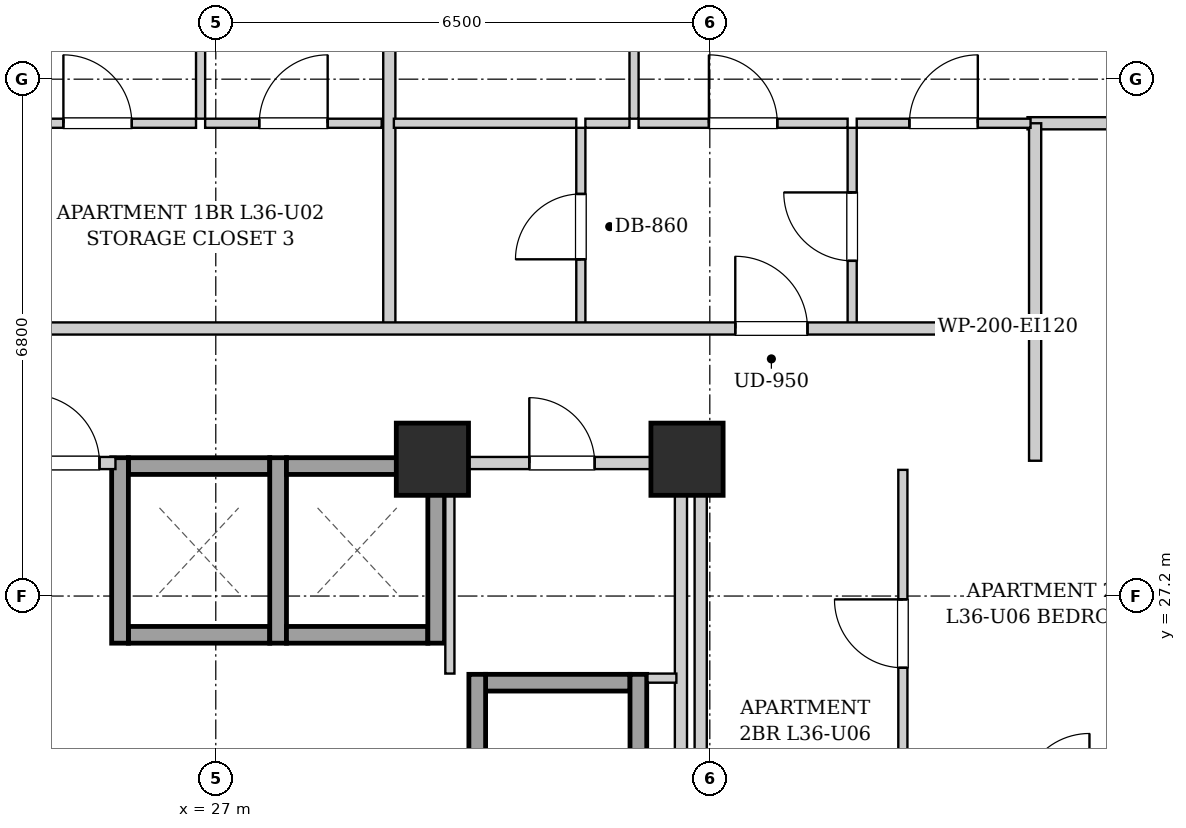
"""IFC4 building model, lengths in metres.
Left out: names, types, materials, properties, quantities, classifications, styles, units other than length and angle.
Written with IfcOpenShell. Run it as: python <this file> out.ifc"""

import sys

from ifc_helpers import new_model, si_unit, direction, frame, frame_2d, origin, origin_2d, place, context, subcontext, project, spatial, rectangle, extrude, element, fill, save


model = new_model("IFC4")
c1 = context("Model", 3, precision=1e-05, world=origin(), true_north=direction((0.0, 1.0)))
c2 = subcontext(c1, "Body", "Model", "MODEL_VIEW")
j1 = project(units=[si_unit("LENGTHUNIT", "METRE"), si_unit("PLANEANGLEUNIT", "RADIAN")], contexts=[c1])
p1 = place(None, origin())
s1 = spatial("IfcSite", under=j1, at=p1, CompositionType="ELEMENT")
p2 = place(p1, origin())
s2 = spatial("IfcBuilding", under=s1, at=p2, CompositionType="ELEMENT")
p3 = place(p2, frame((0.0, 0.0, 127.65)))
s3 = spatial("IfcBuildingStorey", under=s2, at=p3, CompositionType="ELEMENT", Elevation=127.65)
for number, where, z_axis, x_axis in (
    (1, (29.85, 29.0, 0.0), (0.0, 0.0, 1.0), (1.0, 0.0, 0.0)),
    (2, (33.2, 29.0, 0.0), (0.0, 0.0, 1.0), (1.0, 0.0, 0.0)),
):
    element("IfcColumn", number, at=place(p3, frame(where, z_axis=z_axis, x_axis=x_axis)), inside=s3, PredefinedType="COLUMN", context=c2, shape_type="SweptSolid", body=[
        extrude(rectangle(XDim=0.95, YDim=0.95, at=origin_2d()), origin(), (0.0, 0.0, 1.0), 3.25),
    ])
for number, where, z_axis, x_axis in (
    (3, (25.85, 26.69, 0.0), (0.0, 0.0, 1.0), (1.0, 0.0, 0.0)),
    (4, (25.85, 28.91, 0.0), (0.0, 0.0, 1.0), (1.0, 0.0, 0.0)),
):
    element("IfcWall", number, at=place(p3, frame(where, z_axis=z_axis, x_axis=x_axis)), inside=s3, PredefinedType="SHEAR", context=c2, shape_type="SweptSolid", body=[
        extrude(rectangle(XDim=1.86, YDim=0.22, at=frame_2d((0.93, 0.0))), origin(), (0.0, 0.0, 1.0), 2.99),
    ])
for number, where, z_axis, x_axis in (
    (5, (25.74, 26.58, 0.0), (0.0, 0.0, 1.0), (0.0, 1.0, 0.0)),
    (6, (27.82, 26.58, 0.0), (0.0, 0.0, 1.0), (0.0, 1.0, 0.0)),
):
    element("IfcWall", number, at=place(p3, frame(where, z_axis=z_axis, x_axis=x_axis)), inside=s3, PredefinedType="SHEAR", context=c2, shape_type="SweptSolid", body=[
        extrude(rectangle(XDim=2.44, YDim=0.22, at=frame_2d((1.22, 0.0))), origin(), (0.0, 0.0, 1.0), 2.99),
    ])
for number, where, z_axis, x_axis in (
    (7, (27.93, 26.69, 0.0), (0.0, 0.0, 1.0), (1.0, 0.0, 0.0)),
    (8, (27.93, 28.91, 0.0), (0.0, 0.0, 1.0), (1.0, 0.0, 0.0)),
):
    element("IfcWall", number, at=place(p3, frame(where, z_axis=z_axis, x_axis=x_axis)), inside=s3, PredefinedType="SHEAR", context=c2, shape_type="SweptSolid", body=[
        extrude(rectangle(XDim=1.86, YDim=0.22, at=frame_2d((0.93, 0.0))), origin(), (0.0, 0.0, 1.0), 2.99),
    ])
p4 = place(p3, frame((29.9, 26.58, 0.0), z_axis=(0.0, 0.0, 1.0), x_axis=(0.0, 1.0, 0.0)))
e9 = element("IfcWall", 9, at=p4, inside=s3, PredefinedType="SHEAR", context=c2, shape_type="SweptSolid", body=[
    extrude(rectangle(XDim=2.44, YDim=0.22, at=frame_2d((1.22, 0.0))), origin(), (0.0, 0.0, 1.0), 2.99),
])
p5 = place(p3, frame((30.55, 26.06, 0.0), z_axis=(0.0, 0.0, 1.0), x_axis=(1.0, 0.0, 0.0)))
e10 = element("IfcWall", 10, at=p5, inside=s3, PredefinedType="SHEAR", context=c2, shape_type="SweptSolid", body=[
    extrude(rectangle(XDim=1.9, YDim=0.22, at=frame_2d((0.95, 0.0))), origin(), (0.0, 0.0, 1.0), 2.99),
])
for number, where, z_axis, x_axis in (
    (11, (30.44, 24.1, 0.0), (0.0, 0.0, 1.0), (0.0, 1.0, 0.0)),
    (12, (32.56, 24.1, 0.0), (0.0, 0.0, 1.0), (0.0, 1.0, 0.0)),
):
    element("IfcWall", number, at=place(p3, frame(where, z_axis=z_axis, x_axis=x_axis)), inside=s3, PredefinedType="SHEAR", context=c2, shape_type="SweptSolid", body=[
        extrude(rectangle(XDim=2.07, YDim=0.22, at=frame_2d((1.035, 0.0))), origin(), (0.0, 0.0, 1.0), 2.99),
    ])
p6 = place(p3, frame((33.12, 24.12, 0.0), z_axis=(0.0, 0.0, 1.0), x_axis=(0.0, 1.0, 0.0)))
e13 = element("IfcWall", 13, at=p6, inside=s3, PredefinedType="PARTITIONING", context=c2, shape_type="SweptSolid", body=[
    extrude(rectangle(XDim=4.76, YDim=0.16, at=frame_2d((2.38, 0.0))), origin(), (0.0, 0.0, 1.0), 2.325),
])
p7 = place(p3, frame((24.36, 28.95, 0.0), z_axis=(0.0, 0.0, 1.0), x_axis=(1.0, 0.0, 0.0)))
e14 = element("IfcWall", 14, at=p7, inside=s3, PredefinedType="PARTITIONING", context=c2, shape_type="SweptSolid", body=[
    extrude(rectangle(XDim=1.32, YDim=0.16, at=frame_2d((0.66, 0.0))), origin(), (0.0, 0.0, 1.0), 2.426),
])
p8 = place(p7, frame((0.21, 0.0, 0.0)))
e15 = element("IfcOpeningElement", 15, at=p8, cuts=e14, PredefinedType="OPENING", context=c2, shape_type="SweptSolid", body=[
    extrude(rectangle(XDim=0.9, YDim=2.05, at=frame_2d((0.45, 1.025))), frame((0.0, 0.09, 0.0), z_axis=(0.0, -1.0, 0.0), x_axis=(1.0, 0.0, 0.0)), (0.0, 0.0, 1.0), 0.18),
])
p9 = place(p3, frame((30.08, 26.18, 0.0), z_axis=(0.0, 0.0, 1.0), x_axis=(0.0, 1.0, 0.0)))
e16 = element("IfcWall", 16, at=p9, inside=s3, PredefinedType="PARTITIONING", context=c2, shape_type="SweptSolid", body=[
    extrude(rectangle(XDim=2.68, YDim=0.12, at=frame_2d((1.34, 0.0))), origin(), (0.0, 0.0, 1.0), 2.99),
])
p10 = place(p3, frame((32.68, 26.12, 0.0), z_axis=(0.0, 0.0, 1.0), x_axis=(1.0, 0.0, 0.0)))
e17 = element("IfcWall", 17, at=p10, inside=s3, PredefinedType="PARTITIONING", context=c2, shape_type="SweptSolid", body=[
    extrude(rectangle(XDim=0.38, YDim=0.12, at=frame_2d((0.19, 0.0))), origin(), (0.0, 0.0, 1.0), 2.99),
])
p11 = place(p3, frame((30.08, 28.95, 0.0), z_axis=(0.0, 0.0, 1.0), x_axis=(1.0, 0.0, 0.0)))
e18 = element("IfcWall", 18, at=p11, inside=s3, PredefinedType="PARTITIONING", context=c2, shape_type="SweptSolid", body=[
    extrude(rectangle(XDim=2.96, YDim=0.16, at=frame_2d((1.48, 0.0))), origin(), (0.0, 0.0, 1.0), 2.99),
])
p12 = place(p11, frame((1.045, 0.0, 0.0)))
e19 = element("IfcOpeningElement", 19, at=p12, cuts=e18, PredefinedType="OPENING", context=c2, shape_type="SweptSolid", body=[
    extrude(rectangle(XDim=0.86, YDim=2.05, at=frame_2d((0.43, 1.025))), frame((0.0, 0.09, 0.0), z_axis=(0.0, -1.0, 0.0), x_axis=(1.0, 0.0, 0.0)), (0.0, 0.0, 1.0), 0.18),
])
p13 = place(p3, frame((37.78, 28.98, 0.0), z_axis=(0.0, 0.0, 1.0), x_axis=(0.0, 1.0, 0.0)))
e20 = element("IfcWall", 20, at=p13, inside=s3, PredefinedType="PARTITIONING", context=c2, shape_type="SweptSolid", body=[
    extrude(rectangle(XDim=1.74, YDim=0.16, at=frame_2d((0.87, 0.0))), origin(), (0.0, 0.0, 1.0), 2.99),
])
p14 = place(p3, frame((24.15, 33.42, 0.0), z_axis=(0.0, 0.0, 1.0), x_axis=(1.0, 0.0, 0.0)))
e21 = element("IfcWall", 21, at=p14, inside=s3, PredefinedType="PARTITIONING", context=c2, shape_type="SweptSolid", body=[
    extrude(rectangle(XDim=2.59, YDim=0.12, at=frame_2d((1.295, 0.0))), origin(), (0.0, 0.0, 1.0), 2.99),
])
p15 = place(p14, frame((0.845, 0.0, 0.0)))
e22 = element("IfcOpeningElement", 22, at=p15, cuts=e21, PredefinedType="OPENING", context=c2, shape_type="SweptSolid", body=[
    extrude(rectangle(XDim=0.9, YDim=2.05, at=frame_2d((0.45, 1.025))), frame((0.0, 0.07, 0.0), z_axis=(0.0, -1.0, 0.0), x_axis=(1.0, 0.0, 0.0)), (0.0, 0.0, 1.0), 0.14),
])
p16 = place(p3, frame((26.86, 33.42, 0.0), z_axis=(0.0, 0.0, 1.0), x_axis=(1.0, 0.0, 0.0)))
e23 = element("IfcWall", 23, at=p16, inside=s3, PredefinedType="PARTITIONING", context=c2, shape_type="SweptSolid", body=[
    extrude(rectangle(XDim=2.323, YDim=0.12, at=frame_2d((1.162, 0.0))), origin(), (0.0, 0.0, 1.0), 2.99),
])
p17 = place(p16, frame((0.712, 0.0, 0.0)))
e24 = element("IfcOpeningElement", 24, at=p17, cuts=e23, PredefinedType="OPENING", context=c2, shape_type="SweptSolid", body=[
    extrude(rectangle(XDim=0.9, YDim=2.05, at=frame_2d((0.45, 1.025))), frame((0.0, 0.07, 0.0), z_axis=(0.0, -1.0, 0.0), x_axis=(1.0, 0.0, 0.0)), (0.0, 0.0, 1.0), 0.14),
])
p18 = place(p3, frame((26.8, 33.48, 0.0), z_axis=(0.0, 0.0, 1.0), x_axis=(0.0, 1.0, 0.0)))
e25 = element("IfcWall", 25, at=p18, inside=s3, PredefinedType="PARTITIONING", context=c2, shape_type="SweptSolid", body=[
    extrude(rectangle(XDim=9.54, YDim=0.12, at=frame_2d((4.77, 0.0))), origin(), (0.0, 0.0, 1.0), 2.99),
])
p19 = place(p18, frame((4.305, 0.0, 0.0)))
e26 = element("IfcOpeningElement", 26, at=p19, cuts=e25, PredefinedType="OPENING", context=c2, shape_type="SweptSolid", body=[
    extrude(rectangle(XDim=0.9, YDim=2.05, at=frame_2d((0.45, 1.025))), frame((0.0, 0.07, 0.0), z_axis=(0.0, -1.0, 0.0), x_axis=(1.0, 0.0, 0.0)), (0.0, 0.0, 1.0), 0.14),
])
p20 = place(p3, frame((37.68, 33.42, 0.0), z_axis=(0.0, 0.0, 1.0), x_axis=(1.0, 0.0, 0.0)))
e27 = element("IfcWall", 27, at=p20, inside=s3, PredefinedType="PARTITIONING", context=c2, shape_type="SweptSolid", body=[
    extrude(rectangle(XDim=2.34, YDim=0.16, at=frame_2d((1.17, 0.0))), origin(), (0.0, 0.0, 1.0), 2.99),
])
p21 = place(p3, frame((37.78, 30.76, 0.0), z_axis=(0.0, 0.0, 1.0), x_axis=(0.0, 1.0, 0.0)))
e28 = element("IfcWall", 28, at=p21, inside=s3, PredefinedType="PARTITIONING", context=c2, shape_type="SweptSolid", body=[
    extrude(rectangle(XDim=2.66, YDim=0.16, at=frame_2d((1.33, 0.0))), origin(), (0.0, 0.0, 1.0), 2.99),
])
p22 = place(p3, frame((29.283, 30.76, 0.0), z_axis=(0.0, 0.0, 1.0), x_axis=(0.0, 1.0, 0.0)))
e29 = element("IfcWall", 29, at=p22, inside=s3, PredefinedType="PARTITIONING", context=c2, shape_type="SweptSolid", body=[
    extrude(rectangle(XDim=12.26, YDim=0.16, at=frame_2d((6.13, 0.0))), origin(), (0.0, 0.0, 1.0), 2.99),
])
p23 = place(p3, frame((31.803, 30.76, 0.0), z_axis=(0.0, 0.0, 1.0), x_axis=(0.0, 1.0, 0.0)))
e30 = element("IfcWall", 30, at=p23, inside=s3, PredefinedType="PARTITIONING", context=c2, shape_type="SweptSolid", body=[
    extrude(rectangle(XDim=2.6, YDim=0.12, at=frame_2d((1.3, 0.0))), origin(), (0.0, 0.0, 1.0), 2.99),
])
p24 = place(p23, frame((0.87, 0.0, 0.0)))
e31 = element("IfcOpeningElement", 31, at=p24, cuts=e30, PredefinedType="OPENING", context=c2, shape_type="SweptSolid", body=[
    extrude(rectangle(XDim=0.86, YDim=2.05, at=frame_2d((0.43, 1.025))), frame((0.0, 0.07, 0.0), z_axis=(0.0, -1.0, 0.0), x_axis=(1.0, 0.0, 0.0)), (0.0, 0.0, 1.0), 0.14),
])
p25 = place(p3, frame((29.343, 33.42, 0.0), z_axis=(0.0, 0.0, 1.0), x_axis=(1.0, 0.0, 0.0)))
e32 = element("IfcWall", 32, at=p25, inside=s3, PredefinedType="PARTITIONING", context=c2, shape_type="SweptSolid", body=[
    extrude(rectangle(XDim=2.4, YDim=0.12, at=frame_2d((1.2, 0.0))), origin(), (0.0, 0.0, 1.0), 2.99),
])
p26 = place(p3, frame((35.373, 30.76, 0.0), z_axis=(0.0, 0.0, 1.0), x_axis=(0.0, 1.0, 0.0)))
e33 = element("IfcWall", 33, at=p26, inside=s3, PredefinedType="PARTITIONING", context=c2, shape_type="SweptSolid", body=[
    extrude(rectangle(XDim=2.6, YDim=0.12, at=frame_2d((1.3, 0.0))), origin(), (0.0, 0.0, 1.0), 2.99),
])
p27 = place(p26, frame((0.85, 0.0, 0.0)))
e34 = element("IfcOpeningElement", 34, at=p27, cuts=e33, PredefinedType="OPENING", context=c2, shape_type="SweptSolid", body=[
    extrude(rectangle(XDim=0.9, YDim=2.05, at=frame_2d((0.45, 1.025))), frame((0.0, 0.07, 0.0), z_axis=(0.0, -1.0, 0.0), x_axis=(1.0, 0.0, 0.0)), (0.0, 0.0, 1.0), 0.14),
])
p28 = place(p3, frame((31.863, 33.42, 0.0), z_axis=(0.0, 0.0, 1.0), x_axis=(1.0, 0.0, 0.0)))
e35 = element("IfcWall", 35, at=p28, inside=s3, PredefinedType="PARTITIONING", context=c2, shape_type="SweptSolid", body=[
    extrude(rectangle(XDim=0.58, YDim=0.12, at=frame_2d((0.29, 0.0))), origin(), (0.0, 0.0, 1.0), 2.99),
])
p29 = place(p3, frame((32.563, 33.42, 0.0), z_axis=(0.0, 0.0, 1.0), x_axis=(1.0, 0.0, 0.0)))
e36 = element("IfcWall", 36, at=p29, inside=s3, PredefinedType="PARTITIONING", context=c2, shape_type="SweptSolid", body=[
    extrude(rectangle(XDim=2.75, YDim=0.12, at=frame_2d((1.375, 0.0))), origin(), (0.0, 0.0, 1.0), 2.99),
])
p30 = place(p29, frame((0.925, 0.0, 0.0)))
e37 = element("IfcOpeningElement", 37, at=p30, cuts=e36, PredefinedType="OPENING", context=c2, shape_type="SweptSolid", body=[
    extrude(rectangle(XDim=0.9, YDim=2.05, at=frame_2d((0.45, 1.025))), frame((0.0, 0.07, 0.0), z_axis=(0.0, -1.0, 0.0), x_axis=(1.0, 0.0, 0.0)), (0.0, 0.0, 1.0), 0.14),
])
p31 = place(p3, frame((35.433, 33.42, 0.0), z_axis=(0.0, 0.0, 1.0), x_axis=(1.0, 0.0, 0.0)))
e38 = element("IfcWall", 38, at=p31, inside=s3, PredefinedType="PARTITIONING", context=c2, shape_type="SweptSolid", body=[
    extrude(rectangle(XDim=2.287, YDim=0.12, at=frame_2d((1.144, 0.0))), origin(), (0.0, 0.0, 1.0), 2.99),
])
p32 = place(p31, frame((0.693, 0.0, 0.0)))
e39 = element("IfcOpeningElement", 39, at=p32, cuts=e38, PredefinedType="OPENING", context=c2, shape_type="SweptSolid", body=[
    extrude(rectangle(XDim=0.9, YDim=2.05, at=frame_2d((0.45, 1.025))), frame((0.0, 0.07, 0.0), z_axis=(0.0, -1.0, 0.0), x_axis=(1.0, 0.0, 0.0)), (0.0, 0.0, 1.0), 0.14),
])
p33 = place(p3, frame((32.503, 33.48, 0.0), z_axis=(0.0, 0.0, 1.0), x_axis=(0.0, 1.0, 0.0)))
e40 = element("IfcWall", 40, at=p33, inside=s3, PredefinedType="PARTITIONING", context=c2, shape_type="SweptSolid", body=[
    extrude(rectangle(XDim=7.39, YDim=0.12, at=frame_2d((3.695, 0.0))), origin(), (0.0, 0.0, 1.0), 2.99),
])
p34 = place(p33, frame((3.245, 0.0, 0.0)))
e41 = element("IfcOpeningElement", 41, at=p34, cuts=e40, PredefinedType="OPENING", context=c2, shape_type="SweptSolid", body=[
    extrude(rectangle(XDim=0.9, YDim=2.05, at=frame_2d((0.45, 1.025))), frame((0.0, 0.07, 0.0), z_axis=(0.0, -1.0, 0.0), x_axis=(1.0, 0.0, 0.0)), (0.0, 0.0, 1.0), 0.14),
])
p35 = place(p3, frame((36.04, 24.552, 0.0), z_axis=(0.0, 0.0, 1.0), x_axis=(0.0, 1.0, 0.0)))
e42 = element("IfcWall", 42, at=p35, inside=s3, PredefinedType="PARTITIONING", context=c2, shape_type="SweptSolid", body=[
    extrude(rectangle(XDim=4.308, YDim=0.12, at=frame_2d((2.154, 0.0))), origin(), (0.0, 0.0, 1.0), 2.99),
])
p36 = place(p35, frame((1.704, 0.0, 0.0)))
e43 = element("IfcOpeningElement", 43, at=p36, cuts=e42, PredefinedType="OPENING", context=c2, shape_type="SweptSolid", body=[
    extrude(rectangle(XDim=0.9, YDim=2.05, at=frame_2d((0.45, 1.025))), frame((0.0, 0.07, 0.0), z_axis=(0.0, -1.0, 0.0), x_axis=(1.0, 0.0, 0.0)), (0.0, 0.0, 1.0), 0.14),
])
p37 = place(p3, frame((10.05, 30.72, 0.0), z_axis=(0.0, 0.0, 1.0), x_axis=(1.0, 0.0, 0.0)))
e44 = element("IfcWall", 44, at=p37, inside=s3, PredefinedType="PARTITIONING", context=c2, shape_type="SweptSolid", body=[
    extrude(rectangle(XDim=27.7, YDim=0.16, at=frame_2d((13.85, 0.0))), origin(), (0.0, 0.0, 1.0), 2.99),
])
p38 = place(p37, frame((4.295, 0.0, 0.0)))
e45 = element("IfcOpeningElement", 45, at=p38, cuts=e44, PredefinedType="OPENING", context=c2, shape_type="SweptSolid", body=[
    extrude(rectangle(XDim=0.95, YDim=2.1, at=frame_2d((0.475, 1.05))), frame((0.0, 0.09, 0.0), z_axis=(0.0, -1.0, 0.0), x_axis=(1.0, 0.0, 0.0)), (0.0, 0.0, 1.0), 0.18),
])
p39 = place(p37, frame((23.785, 0.0, 0.0)))
e46 = element("IfcOpeningElement", 46, at=p39, cuts=e44, PredefinedType="OPENING", context=c2, shape_type="SweptSolid", body=[
    extrude(rectangle(XDim=0.95, YDim=2.1, at=frame_2d((0.475, 1.05))), frame((0.0, 0.09, 0.0), z_axis=(0.0, -1.0, 0.0), x_axis=(1.0, 0.0, 0.0)), (0.0, 0.0, 1.0), 0.18),
])
p40 = place(p3, frame((33.38, 15.02, 0.0), z_axis=(0.0, 0.0, 1.0), x_axis=(0.0, 1.0, 0.0)))
e47 = element("IfcWall", 47, at=p40, inside=s3, PredefinedType="PARTITIONING", context=c2, shape_type="SweptSolid", body=[
    extrude(rectangle(XDim=13.98, YDim=0.16, at=frame_2d((6.99, 0.0))), origin(), (0.0, 0.0, 1.0), 2.325),
])
p41 = place(p8, origin())
e48 = element("IfcDoor", 48, at=p41, inside=s3, OperationType="SINGLE_SWING_LEFT", PredefinedType="DOOR", context=c2, shape_type="SweptSolid", body=[
    extrude(rectangle(XDim=0.9, YDim=2.05, at=frame_2d((0.45, 1.025))), frame((0.0, 0.025, 0.0), z_axis=(0.0, -1.0, 0.0), x_axis=(1.0, 0.0, 0.0)), (0.0, 0.0, 1.0), 0.05),
])
fill(e15, e48)
p42 = place(p12, origin())
e49 = element("IfcDoor", 49, at=p42, inside=s3, OperationType="SINGLE_SWING_LEFT", PredefinedType="DOOR", context=c2, shape_type="SweptSolid", body=[
    extrude(rectangle(XDim=0.86, YDim=2.05, at=frame_2d((0.43, 1.025))), frame((0.0, 0.025, 0.0), z_axis=(0.0, -1.0, 0.0), x_axis=(1.0, 0.0, 0.0)), (0.0, 0.0, 1.0), 0.05),
])
fill(e19, e49)
p43 = place(p15, origin())
e50 = element("IfcDoor", 50, at=p43, inside=s3, OperationType="SINGLE_SWING_LEFT", PredefinedType="DOOR", context=c2, shape_type="SweptSolid", body=[
    extrude(rectangle(XDim=0.9, YDim=2.05, at=frame_2d((0.45, 1.025))), frame((0.0, 0.025, 0.0), z_axis=(0.0, -1.0, 0.0), x_axis=(1.0, 0.0, 0.0)), (0.0, 0.0, 1.0), 0.05),
])
fill(e22, e50)
p44 = place(p17, origin())
e51 = element("IfcDoor", 51, at=p44, inside=s3, OperationType="SINGLE_SWING_RIGHT", PredefinedType="DOOR", context=c2, shape_type="SweptSolid", body=[
    extrude(rectangle(XDim=0.9, YDim=2.05, at=frame_2d((0.45, 1.025))), frame((0.0, 0.025, 0.0), z_axis=(0.0, -1.0, 0.0), x_axis=(1.0, 0.0, 0.0)), (0.0, 0.0, 1.0), 0.05),
])
fill(e24, e51)
p45 = place(p24, origin())
e52 = element("IfcDoor", 52, at=p45, inside=s3, OperationType="SINGLE_SWING_LEFT", PredefinedType="DOOR", context=c2, shape_type="SweptSolid", body=[
    extrude(rectangle(XDim=0.86, YDim=2.05, at=frame_2d((0.43, 1.025))), frame((0.0, 0.025, 0.0), z_axis=(0.0, -1.0, 0.0), x_axis=(1.0, 0.0, 0.0)), (0.0, 0.0, 1.0), 0.05),
])
fill(e31, e52)
p46 = place(p27, origin())
e53 = element("IfcDoor", 53, at=p46, inside=s3, OperationType="SINGLE_SWING_RIGHT", PredefinedType="DOOR", context=c2, shape_type="SweptSolid", body=[
    extrude(rectangle(XDim=0.9, YDim=2.05, at=frame_2d((0.45, 1.025))), frame((0.0, 0.025, 0.0), z_axis=(0.0, -1.0, 0.0), x_axis=(1.0, 0.0, 0.0)), (0.0, 0.0, 1.0), 0.05),
])
fill(e34, e53)
p47 = place(p30, origin())
e54 = element("IfcDoor", 54, at=p47, inside=s3, OperationType="SINGLE_SWING_LEFT", PredefinedType="DOOR", context=c2, shape_type="SweptSolid", body=[
    extrude(rectangle(XDim=0.9, YDim=2.05, at=frame_2d((0.45, 1.025))), frame((0.0, 0.025, 0.0), z_axis=(0.0, -1.0, 0.0), x_axis=(1.0, 0.0, 0.0)), (0.0, 0.0, 1.0), 0.05),
])
fill(e37, e54)
p48 = place(p32, origin())
e55 = element("IfcDoor", 55, at=p48, inside=s3, OperationType="SINGLE_SWING_RIGHT", PredefinedType="DOOR", context=c2, shape_type="SweptSolid", body=[
    extrude(rectangle(XDim=0.9, YDim=2.05, at=frame_2d((0.45, 1.025))), frame((0.0, 0.025, 0.0), z_axis=(0.0, -1.0, 0.0), x_axis=(1.0, 0.0, 0.0)), (0.0, 0.0, 1.0), 0.05),
])
fill(e39, e55)
p49 = place(p36, origin())
e56 = element("IfcDoor", 56, at=p49, inside=s3, OperationType="SINGLE_SWING_RIGHT", PredefinedType="DOOR", context=c2, shape_type="SweptSolid", body=[
    extrude(rectangle(XDim=0.9, YDim=2.05, at=frame_2d((0.45, 1.025))), frame((0.0, 0.025, 0.0), z_axis=(0.0, -1.0, 0.0), x_axis=(1.0, 0.0, 0.0)), (0.0, 0.0, 1.0), 0.05),
])
fill(e43, e56)
p50 = place(p39, origin())
e57 = element("IfcDoor", 57, at=p50, inside=s3, OperationType="SINGLE_SWING_LEFT", PredefinedType="DOOR", context=c2, shape_type="SweptSolid", body=[
    extrude(rectangle(XDim=0.95, YDim=2.1, at=frame_2d((0.475, 1.05))), frame((0.0, 0.025, 0.0), z_axis=(0.0, -1.0, 0.0), x_axis=(1.0, 0.0, 0.0)), (0.0, 0.0, 1.0), 0.05),
])
fill(e46, e57)
save(model, sys.argv[1])
